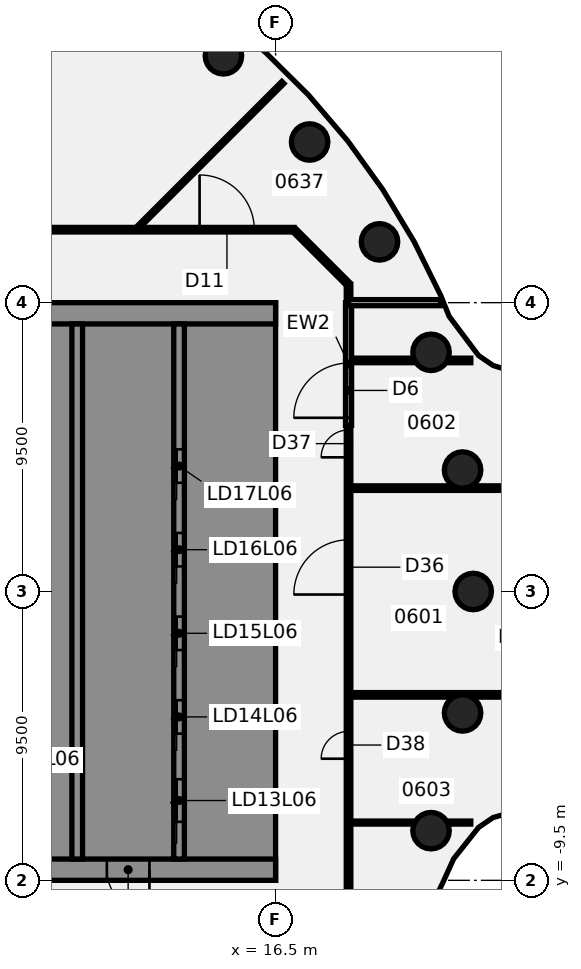
"""IFC4 building model, lengths in metres.
Left out: names, types, materials, properties, quantities, classifications, styles, units other than length and angle.
Written with IfcOpenShell. Run it as: python <this file> out.ifc"""

import sys

from ifc_helpers import new_model, si_unit, direction, frame, frame_2d, origin, origin_2d, place, context, subcontext, project, spatial, polyline, rectangle, circle, outline, extrude, element, fill, save


model = new_model("IFC4")
c1 = context("Model", 3, precision=1e-05, world=origin(), true_north=direction((0.0, 1.0)))
c2 = subcontext(c1, "Body", "Model", "MODEL_VIEW")
j1 = project(units=[si_unit("LENGTHUNIT", "METRE"), si_unit("PLANEANGLEUNIT", "RADIAN")], contexts=[c1])
p1 = place(None, origin())
s1 = spatial("IfcSite", under=j1, at=p1, CompositionType="ELEMENT")
p2 = place(p1, origin())
s2 = spatial("IfcBuilding", under=s1, at=p2, CompositionType="ELEMENT")
p3 = place(p2, frame((0.0, 0.0, 34.0)))
s3 = spatial("IfcBuildingStorey", under=s2, at=p3, CompositionType="ELEMENT", Elevation=34.0)
for number, where, z_axis, x_axis in (
    (1, (23.0, 0.0, -0.14), (0.0, 0.0, 1.0), (1.0, 0.0, 0.0)),
    (2, (22.651, 3.994, -0.14), (0.0, 0.0, 1.0), (1.0, 0.0, 0.0)),
    (3, (21.613, 7.866, -0.14), (0.0, 0.0, 1.0), (1.0, 0.0, 0.0)),
    (4, (19.919, 11.5, -0.14), (0.0, 0.0, 1.0), (1.0, 0.0, 0.0)),
    (5, (17.619, 14.784, -0.14), (0.0, 0.0, 1.0), (1.0, 0.0, 0.0)),
    (6, (14.784, 17.619, -0.14), (0.0, 0.0, 1.0), (1.0, 0.0, 0.0)),
    (7, (21.613, -7.866, -0.14), (0.0, 0.0, 1.0), (1.0, 0.0, 0.0)),
    (8, (22.651, -3.994, -0.14), (0.0, 0.0, 1.0), (1.0, 0.0, 0.0)),
):
    element("IfcColumn", number, at=place(p3, frame(where, z_axis=z_axis, x_axis=x_axis)), inside=s3, PredefinedType="COLUMN", context=c2, shape_type="SweptSolid", body=[
        extrude(circle(Radius=0.6, at=origin_2d()), origin(), (0.0, 0.0, 1.0), 3.75),
    ])
p4 = place(p3, frame((17.128, 11.872, 0.0), z_axis=(0.0, 0.0, 1.0), x_axis=(0.707106781187, -0.707106781187, 0.0)))
e9 = element("IfcWall", 9, at=p4, inside=s3, PredefinedType="PARTITIONING", context=c2, shape_type="SweptSolid", body=[
    extrude(rectangle(XDim=2.465, YDim=0.15, at=frame_2d((1.232, 0.0))), origin(), (0.0, 0.0, 1.0), 3.01),
])
p5 = place(p3, frame((18.955, -3.4, 0.0), z_axis=(0.0, 0.0, 1.0), x_axis=(1.0, 0.0, 0.0)))
e10 = element("IfcWall", 10, at=p5, inside=s3, PredefinedType="PARTITIONING", context=c2, shape_type="SweptSolid", body=[
    extrude(rectangle(XDim=3.635, YDim=0.15, at=frame_2d((1.818, 0.0))), origin(), (0.0, 0.0, 1.0), 3.01),
])
p6 = place(p3, frame((22.711, -3.4, 0.0), z_axis=(0.0, 0.0, 1.0), x_axis=(1.0, 0.0, 0.0)))
e11 = element("IfcWall", 11, at=p6, inside=s3, PredefinedType="PARTITIONING", context=c2, shape_type="SweptSolid", body=[
    extrude(rectangle(XDim=3.004, YDim=0.15, at=frame_2d((1.502, 0.0))), origin(), (0.0, 0.0, 1.0), 3.01),
])
p7 = place(p3, frame((18.955, 3.4, 0.0), z_axis=(0.0, 0.0, 1.0), x_axis=(1.0, 0.0, 0.0)))
e12 = element("IfcWall", 12, at=p7, inside=s3, PredefinedType="PARTITIONING", context=c2, shape_type="SweptSolid", body=[
    extrude(rectangle(XDim=3.635, YDim=0.15, at=frame_2d((1.818, 0.0))), origin(), (0.0, 0.0, 1.0), 3.01),
])
p8 = place(p3, frame((22.711, 3.4, 0.0), z_axis=(0.0, 0.0, 1.0), x_axis=(1.0, 0.0, 0.0)))
e13 = element("IfcWall", 13, at=p8, inside=s3, PredefinedType="PARTITIONING", context=c2, shape_type="SweptSolid", body=[
    extrude(rectangle(XDim=3.004, YDim=0.15, at=frame_2d((1.502, 0.0))), origin(), (0.0, 0.0, 1.0), 3.01),
])
p9 = place(p3, frame((18.955, -7.6, 0.0), z_axis=(0.0, 0.0, 1.0), x_axis=(1.0, 0.0, 0.0)))
e14 = element("IfcWall", 14, at=p9, inside=s3, PredefinedType="PARTITIONING", context=c2, shape_type="SweptSolid", body=[
    extrude(rectangle(XDim=2.119, YDim=0.1, at=frame_2d((1.06, 0.0))), origin(), (0.0, 0.0, 1.0), 3.01),
])
p10 = place(p3, frame((22.152, -7.6, 0.0), z_axis=(0.0, 0.0, 1.0), x_axis=(1.0, 0.0, 0.0)))
e15 = element("IfcWall", 15, at=p10, inside=s3, PredefinedType="PARTITIONING", context=c2, shape_type="SweptSolid", body=[
    extrude(rectangle(XDim=0.769, YDim=0.1, at=frame_2d((0.385, 0.0))), origin(), (0.0, 0.0, 1.0), 3.01),
])
p11 = place(p3, frame((18.9, 7.6, 0.0), z_axis=(0.0, 0.0, 1.0), x_axis=(1.0, 0.0, 0.0)))
e16 = element("IfcWall", 16, at=p11, inside=s3, PredefinedType="PARTITIONING", context=c2, shape_type="SweptSolid", body=[
    extrude(rectangle(XDim=2.174, YDim=0.15, at=frame_2d((1.087, 0.0))), origin(), (0.0, 0.0, 1.0), 3.01),
])
p12 = place(p3, frame((22.152, 7.6, 0.0), z_axis=(0.0, 0.0, 1.0), x_axis=(1.0, 0.0, 0.0)))
e17 = element("IfcWall", 17, at=p12, inside=s3, PredefinedType="PARTITIONING", context=c2, shape_type="SweptSolid", body=[
    extrude(rectangle(XDim=0.77, YDim=0.15, at=frame_2d((0.385, 0.0))), origin(), (0.0, 0.0, 1.0), 3.01),
])
p13 = place(p3, frame((-17.065, 11.9, 0.0), z_axis=(0.0, 0.0, 1.0), x_axis=(1.0, 0.0, 0.0)))
e18 = element("IfcWall", 18, at=p13, inside=s3, PredefinedType="PARTITIONING", context=c2, shape_type="SweptSolid", body=[
    extrude(rectangle(XDim=34.165, YDim=0.15, at=frame_2d((17.083, 0.0))), origin(), (0.0, 0.0, 1.0), 3.01),
])
p14 = place(p13, frame((16.215, 0.0, 0.0)))
e19 = element("IfcOpeningElement", 19, at=p14, cuts=e18, PredefinedType="OPENING", context=c2, shape_type="SweptSolid", body=[
    extrude(rectangle(XDim=1.8, YDim=2.1, at=frame_2d((0.9, 1.05))), frame((0.0, 0.085, 0.0), z_axis=(0.0, -1.0, 0.0), x_axis=(1.0, 0.0, 0.0)), (0.0, 0.0, 1.0), 0.17),
])
p15 = place(p13, frame((31.065, 0.0, 0.0)))
e20 = element("IfcOpeningElement", 20, at=p15, cuts=e18, PredefinedType="OPENING", context=c2, shape_type="SweptSolid", body=[
    extrude(rectangle(XDim=1.8, YDim=2.1, at=frame_2d((0.9, 1.05))), frame((0.0, 0.085, 0.0), z_axis=(0.0, -1.0, 0.0), x_axis=(1.0, 0.0, 0.0)), (0.0, 0.0, 1.0), 0.17),
])
p16 = place(p13, frame((6.065, 0.0, 0.0)))
e21 = element("IfcOpeningElement", 21, at=p16, cuts=e18, PredefinedType="OPENING", context=c2, shape_type="SweptSolid", body=[
    extrude(rectangle(XDim=1.8, YDim=2.1, at=frame_2d((0.9, 1.05))), frame((0.0, 0.085, 0.0), z_axis=(0.0, -1.0, 0.0), x_axis=(1.0, 0.0, 0.0)), (0.0, 0.0, 1.0), 0.17),
])
p17 = place(p3, frame((11.992, 11.992, 0.0), z_axis=(0.0, 0.0, 1.0), x_axis=(0.707106781187, 0.707106781187, 0.0)))
e22 = element("IfcWall", 22, at=p17, inside=s3, PredefinedType="PARTITIONING", context=c2, shape_type="SweptSolid", body=[
    extrude(rectangle(XDim=6.715, YDim=0.1, at=frame_2d((3.358, 0.0))), origin(), (0.0, 0.0, 1.0), 3.01),
])
p18 = place(p3, frame((18.9, -10.1, 0.0), z_axis=(0.0, 0.0, 1.0), x_axis=(0.0, 1.0, 0.0)))
e23 = element("IfcWall", 23, at=p18, inside=s3, PredefinedType="PARTITIONING", context=c2, shape_type="SweptSolid", body=[
    extrude(rectangle(XDim=15.463, YDim=0.15, at=frame_2d((7.731, 0.0))), origin(), (0.0, 0.0, 1.0), 3.01),
])
p19 = place(p18, frame((10.0, 0.0, 0.0)))
e24 = element("IfcOpeningElement", 24, at=p19, cuts=e23, PredefinedType="OPENING", context=c2, shape_type="SweptSolid", body=[
    extrude(rectangle(XDim=1.8, YDim=2.1, at=frame_2d((0.9, 1.05))), frame((0.0, 0.085, 0.0), z_axis=(0.0, -1.0, 0.0), x_axis=(1.0, 0.0, 0.0)), (0.0, 0.0, 1.0), 0.17),
])
p20 = place(p18, frame((14.513, 0.0, 0.0)))
e25 = element("IfcOpeningElement", 25, at=p20, cuts=e23, PredefinedType="OPENING", context=c2, shape_type="SweptSolid", body=[
    extrude(rectangle(XDim=0.9, YDim=2.1, at=frame_2d((0.45, 1.05))), frame((0.0, 0.085, 0.0), z_axis=(0.0, -1.0, 0.0), x_axis=(1.0, 0.0, 0.0)), (0.0, 0.0, 1.0), 0.17),
])
p21 = place(p18, frame((4.6, 0.0, 0.0)))
e26 = element("IfcOpeningElement", 26, at=p21, cuts=e23, PredefinedType="OPENING", context=c2, shape_type="SweptSolid", body=[
    extrude(rectangle(XDim=0.9, YDim=2.1, at=frame_2d((0.45, 1.05))), frame((0.0, 0.085, 0.0), z_axis=(0.0, -1.0, 0.0), x_axis=(1.0, 0.0, 0.0)), (0.0, 0.0, 1.0), 0.17),
])
p22 = place(p3, frame((18.9, 9.6, 0.0), z_axis=(0.0, 0.0, 1.0), x_axis=(0.0, 1.0, 0.0)))
e27 = element("IfcWall", 27, at=p22, inside=s3, PredefinedType="PARTITIONING", context=c2, shape_type="SweptSolid", body=[
    extrude(rectangle(XDim=0.5, YDim=0.15, at=frame_2d((0.25, 0.0))), origin(), (0.0, 0.0, 1.0), 3.01),
])
p23 = place(p3, frame((18.9, 5.463, 0.0), z_axis=(0.0, 0.0, 1.0), x_axis=(0.0, 1.0, 0.0)))
e28 = element("IfcWall", 28, at=p23, inside=s3, PredefinedType="SOLIDWALL", context=c2, shape_type="SweptSolid", body=[
    extrude(rectangle(XDim=4.037, YDim=0.2, at=frame_2d((2.019, 0.0))), origin(), (0.0, 0.0, 1.0), 3.014),
])
p24 = place(p23, frame((0.25, 0.0, 0.0)))
e29 = element("IfcOpeningElement", 29, at=p24, cuts=e28, PredefinedType="OPENING", context=c2, shape_type="SweptSolid", body=[
    extrude(rectangle(XDim=1.8, YDim=2.4, at=frame_2d((0.9, 1.2))), frame((0.0, 0.11, 0.0), z_axis=(0.0, -1.0, 0.0), x_axis=(1.0, 0.0, 0.0)), (0.0, 0.0, 1.0), 0.22),
])
p25 = place(p3, frame((18.9, 9.5, 0.0), z_axis=(0.0, 0.0, 1.0), x_axis=(1.0, 0.0, 0.0)))
e30 = element("IfcWall", 30, at=p25, inside=s3, PredefinedType="SOLIDWALL", context=c2, shape_type="SweptSolid", body=[
    extrude(rectangle(XDim=3.028, YDim=0.2, at=frame_2d((1.514, 0.0))), origin(), (0.0, 0.0, 1.0), 3.61),
])
p26 = place(p3, frame((16.5, -9.15, 0.0), z_axis=(0.0, 0.0, 1.0), x_axis=(-1.0, 0.0, 0.0)))
e31 = element("IfcWall", 31, at=p26, inside=s3, PredefinedType="SHEAR", context=c2, shape_type="SweptSolid", body=[
    extrude(rectangle(XDim=13.0, YDim=0.7, at=frame_2d((6.5, 0.0))), origin(), (0.0, 0.0, 1.0), 3.61),
])
p27 = place(p26, frame((4.15, 0.0, 0.0)))
e32 = element("IfcOpeningElement", 32, at=p27, cuts=e31, PredefinedType="OPENING", context=c2, shape_type="SweptSolid", body=[
    extrude(rectangle(XDim=1.4, YDim=2.1, at=frame_2d((0.7, 1.05))), frame((0.0, 0.36, 0.0), z_axis=(0.0, -1.0, 0.0), x_axis=(1.0, 0.0, 0.0)), (0.0, 0.0, 1.0), 0.72),
])
p28 = place(p26, frame((10.125, 0.0, 0.0)))
e33 = element("IfcOpeningElement", 33, at=p28, cuts=e31, PredefinedType="OPENING", context=c2, shape_type="SweptSolid", body=[
    extrude(rectangle(XDim=1.4, YDim=2.1, at=frame_2d((0.7, 1.05))), frame((0.0, 0.36, 0.0), z_axis=(0.0, -1.0, 0.0), x_axis=(1.0, 0.0, 0.0)), (0.0, 0.0, 1.0), 0.72),
])
p29 = place(p3, origin())
e34 = element("IfcWall", 34, at=p29, inside=s3, PredefinedType="SHEAR", context=c2, shape_type="SweptSolid", body=[
    extrude(outline(polyline([(13.5, -8.8), (15.8, -8.8), (16.5, -8.8), (16.5, 8.8), (15.8, 8.8), (13.5, 8.8), (13.5, 8.125), (15.8, 8.125), (15.8, 5.625), (13.5, 5.625), (13.5, 5.375), (15.8, 5.375), (15.8, 2.875), (13.5, 2.875), (13.5, 2.625), (15.8, 2.625), (15.8, 0.125), (13.5, 0.125), (13.5, -0.125), (15.8, -0.125), (15.8, -2.625), (13.5, -2.625), (13.5, -2.875), (15.8, -2.875), (15.8, -5.375), (13.5, -5.375), (13.5, -5.625), (15.8, -5.625), (15.8, -8.125), (13.5, -8.125), (13.5, -8.8)])), origin(), (0.0, 0.0, 1.0), 3.61),
])
p30 = place(p3, frame((16.5, 9.15, 0.0), z_axis=(0.0, 0.0, 1.0), x_axis=(-1.0, 0.0, 0.0)))
e35 = element("IfcWall", 35, at=p30, inside=s3, PredefinedType="SHEAR", context=c2, shape_type="SweptSolid", body=[
    extrude(rectangle(XDim=13.0, YDim=0.7, at=frame_2d((6.5, 0.0))), origin(), (0.0, 0.0, 1.0), 3.61),
])
p31 = place(p3, origin())
e36 = element("IfcWall", 36, at=p31, inside=s3, PredefinedType="SHEAR", context=c2, shape_type="SweptSolid", body=[
    extrude(outline(polyline([(9.8, -5.375), (7.5, -5.375), (7.5, -2.875), (9.8, -2.875), (9.8, -2.625), (7.5, -2.625), (7.5, -0.125), (9.8, -0.125), (9.8, 0.125), (7.5, 0.125), (7.5, 2.625), (9.8, 2.625), (9.8, 2.875), (7.5, 2.875), (7.5, 5.375), (9.8, 5.375), (9.8, 5.625), (7.5, 5.625), (7.5, 8.125), (9.8, 8.125), (9.8, 8.8), (7.5, 8.8), (7.15, 8.8), (7.15, -5.625), (7.5, -5.625), (9.8, -5.625), (9.8, -5.375)])), origin(), (0.0, 0.0, 1.0), 3.61),
])
p32 = place(p3, origin())
e37 = element("IfcWall", 37, at=p32, inside=s3, PredefinedType="SHEAR", context=c2, shape_type="SweptSolid", body=[
    extrude(outline(polyline([(7.5, -8.125), (7.5, -8.8), (9.8, -8.8), (9.8, -8.125), (9.8, -5.625), (9.55, -5.625), (9.55, -8.125), (7.5, -8.125)])), origin(), (0.0, 0.0, 1.0), 3.61),
])
p33 = place(p3, frame((13.325, -8.8, 0.0), z_axis=(0.0, 0.0, 1.0), x_axis=(0.0, 1.0, 0.0)))
e38 = element("IfcWall", 38, at=p33, inside=s3, PredefinedType="SHEAR", context=c2, shape_type="SweptSolid", body=[
    extrude(rectangle(XDim=17.6, YDim=0.35, at=frame_2d((8.8, 0.0))), origin(), (0.0, 0.0, 1.0), 3.61),
])
p34 = place(p33, frame((1.225, 0.0, 0.0)))
e39 = element("IfcOpeningElement", 39, at=p34, cuts=e38, PredefinedType="OPENING", context=c2, shape_type="SweptSolid", body=[
    extrude(rectangle(XDim=1.4, YDim=2.1, at=frame_2d((0.7, 1.05))), frame((0.0, 0.185, 0.0), z_axis=(0.0, -1.0, 0.0), x_axis=(1.0, 0.0, 0.0)), (0.0, 0.0, 1.0), 0.37),
])
p35 = place(p33, frame((4.125, 0.0, 0.0)))
e40 = element("IfcOpeningElement", 40, at=p35, cuts=e38, PredefinedType="OPENING", context=c2, shape_type="SweptSolid", body=[
    extrude(rectangle(XDim=1.1, YDim=2.1, at=frame_2d((0.55, 1.05))), frame((0.0, 0.185, 0.0), z_axis=(0.0, -1.0, 0.0), x_axis=(1.0, 0.0, 0.0)), (0.0, 0.0, 1.0), 0.37),
])
p36 = place(p33, frame((6.875, 0.0, 0.0)))
e41 = element("IfcOpeningElement", 41, at=p36, cuts=e38, PredefinedType="OPENING", context=c2, shape_type="SweptSolid", body=[
    extrude(rectangle(XDim=1.1, YDim=2.1, at=frame_2d((0.55, 1.05))), frame((0.0, 0.185, 0.0), z_axis=(0.0, -1.0, 0.0), x_axis=(1.0, 0.0, 0.0)), (0.0, 0.0, 1.0), 0.37),
])
p37 = place(p33, frame((9.625, 0.0, 0.0)))
e42 = element("IfcOpeningElement", 42, at=p37, cuts=e38, PredefinedType="OPENING", context=c2, shape_type="SweptSolid", body=[
    extrude(rectangle(XDim=1.1, YDim=2.1, at=frame_2d((0.55, 1.05))), frame((0.0, 0.185, 0.0), z_axis=(0.0, -1.0, 0.0), x_axis=(1.0, 0.0, 0.0)), (0.0, 0.0, 1.0), 0.37),
])
p38 = place(p33, frame((12.375, 0.0, 0.0)))
e43 = element("IfcOpeningElement", 43, at=p38, cuts=e38, PredefinedType="OPENING", context=c2, shape_type="SweptSolid", body=[
    extrude(rectangle(XDim=1.1, YDim=2.1, at=frame_2d((0.55, 1.05))), frame((0.0, 0.185, 0.0), z_axis=(0.0, -1.0, 0.0), x_axis=(1.0, 0.0, 0.0)), (0.0, 0.0, 1.0), 0.37),
])
p39 = place(p3, frame((9.975, -8.8, 0.0), z_axis=(0.0, 0.0, 1.0), x_axis=(0.0, 1.0, 0.0)))
e44 = element("IfcWall", 44, at=p39, inside=s3, PredefinedType="SHEAR", context=c2, shape_type="SweptSolid", body=[
    extrude(rectangle(XDim=17.6, YDim=0.35, at=frame_2d((8.8, 0.0))), origin(), (0.0, 0.0, 1.0), 3.61),
])
p40 = place(p15, origin())
e45 = element("IfcDoor", 45, at=p40, inside=s3, OperationType="DOUBLE_DOOR_SINGLE_SWING", PredefinedType="DOOR", context=c2, shape_type="SweptSolid", body=[
    extrude(rectangle(XDim=1.8, YDim=2.1, at=frame_2d((0.9, 1.05))), frame((0.0, 0.025, 0.0), z_axis=(0.0, -1.0, 0.0), x_axis=(1.0, 0.0, 0.0)), (0.0, 0.0, 1.0), 0.05),
])
fill(e20, e45)
p41 = place(p19, origin())
e46 = element("IfcDoor", 46, at=p41, inside=s3, OperationType="DOUBLE_DOOR_SINGLE_SWING", PredefinedType="DOOR", context=c2, shape_type="SweptSolid", body=[
    extrude(rectangle(XDim=1.8, YDim=2.1, at=frame_2d((0.9, 1.05))), frame((0.0, 0.025, 0.0), z_axis=(0.0, -1.0, 0.0), x_axis=(1.0, 0.0, 0.0)), (0.0, 0.0, 1.0), 0.05),
])
fill(e24, e46)
p42 = place(p20, frame((0.9, 0.0, 0.0), z_axis=(0.0, 0.0, 1.0), x_axis=(-1.0, 0.0, 0.0)))
e47 = element("IfcDoor", 47, at=p42, inside=s3, OperationType="SINGLE_SWING_RIGHT", PredefinedType="DOOR", context=c2, shape_type="SweptSolid", body=[
    extrude(rectangle(XDim=0.9, YDim=2.1, at=frame_2d((0.45, 1.05))), frame((0.0, 0.025, 0.0), z_axis=(0.0, -1.0, 0.0), x_axis=(1.0, 0.0, 0.0)), (0.0, 0.0, 1.0), 0.05),
])
fill(e25, e47)
p43 = place(p21, frame((0.9, 0.0, 0.0), z_axis=(0.0, 0.0, 1.0), x_axis=(-1.0, 0.0, 0.0)))
e48 = element("IfcDoor", 48, at=p43, inside=s3, OperationType="SINGLE_SWING_LEFT", PredefinedType="DOOR", context=c2, shape_type="SweptSolid", body=[
    extrude(rectangle(XDim=0.9, YDim=2.1, at=frame_2d((0.45, 1.05))), frame((0.0, 0.025, 0.0), z_axis=(0.0, -1.0, 0.0), x_axis=(1.0, 0.0, 0.0)), (0.0, 0.0, 1.0), 0.05),
])
fill(e26, e48)
p44 = place(p24, origin())
e49 = element("IfcDoor", 49, at=p44, inside=s3, OperationType="SINGLE_SWING_LEFT", PredefinedType="DOOR", context=c2, shape_type="SweptSolid", body=[
    extrude(rectangle(XDim=1.8, YDim=2.4, at=frame_2d((0.9, 1.2))), frame((0.0, 0.025, 0.0), z_axis=(0.0, -1.0, 0.0), x_axis=(1.0, 0.0, 0.0)), (0.0, 0.0, 1.0), 0.05),
])
fill(e29, e49)
p45 = place(p27, origin())
e50 = element("IfcDoor", 50, at=p45, inside=s3, OperationType="SINGLE_SWING_LEFT", PredefinedType="DOOR", context=c2, shape_type="SweptSolid", body=[
    extrude(rectangle(XDim=1.4, YDim=2.1, at=frame_2d((0.7, 1.05))), frame((0.0, 0.025, 0.0), z_axis=(0.0, -1.0, 0.0), x_axis=(1.0, 0.0, 0.0)), (0.0, 0.0, 1.0), 0.05),
])
fill(e32, e50)
p46 = place(p34, origin())
e51 = element("IfcDoor", 51, at=p46, inside=s3, OperationType="SLIDING_TO_LEFT", PredefinedType="DOOR", context=c2, shape_type="SweptSolid", body=[
    extrude(rectangle(XDim=1.4, YDim=2.1, at=frame_2d((0.7, 1.05))), frame((0.0, 0.025, 0.0), z_axis=(0.0, -1.0, 0.0), x_axis=(1.0, 0.0, 0.0)), (0.0, 0.0, 1.0), 0.05),
])
fill(e39, e51)
p47 = place(p35, origin())
e52 = element("IfcDoor", 52, at=p47, inside=s3, OperationType="SLIDING_TO_LEFT", PredefinedType="DOOR", context=c2, shape_type="SweptSolid", body=[
    extrude(rectangle(XDim=1.1, YDim=2.1, at=frame_2d((0.55, 1.05))), frame((0.0, 0.025, 0.0), z_axis=(0.0, -1.0, 0.0), x_axis=(1.0, 0.0, 0.0)), (0.0, 0.0, 1.0), 0.05),
])
fill(e40, e52)
p48 = place(p36, origin())
e53 = element("IfcDoor", 53, at=p48, inside=s3, OperationType="SLIDING_TO_LEFT", PredefinedType="DOOR", context=c2, shape_type="SweptSolid", body=[
    extrude(rectangle(XDim=1.1, YDim=2.1, at=frame_2d((0.55, 1.05))), frame((0.0, 0.025, 0.0), z_axis=(0.0, -1.0, 0.0), x_axis=(1.0, 0.0, 0.0)), (0.0, 0.0, 1.0), 0.05),
])
fill(e41, e53)
p49 = place(p37, origin())
e54 = element("IfcDoor", 54, at=p49, inside=s3, OperationType="SLIDING_TO_LEFT", PredefinedType="DOOR", context=c2, shape_type="SweptSolid", body=[
    extrude(rectangle(XDim=1.1, YDim=2.1, at=frame_2d((0.55, 1.05))), frame((0.0, 0.025, 0.0), z_axis=(0.0, -1.0, 0.0), x_axis=(1.0, 0.0, 0.0)), (0.0, 0.0, 1.0), 0.05),
])
fill(e42, e54)
p50 = place(p38, origin())
e55 = element("IfcDoor", 55, at=p50, inside=s3, OperationType="SLIDING_TO_LEFT", PredefinedType="DOOR", context=c2, shape_type="SweptSolid", body=[
    extrude(rectangle(XDim=1.1, YDim=2.1, at=frame_2d((0.55, 1.05))), frame((0.0, 0.025, 0.0), z_axis=(0.0, -1.0, 0.0), x_axis=(1.0, 0.0, 0.0)), (0.0, 0.0, 1.0), 0.05),
])
fill(e43, e55)
save(model, sys.argv[1])
